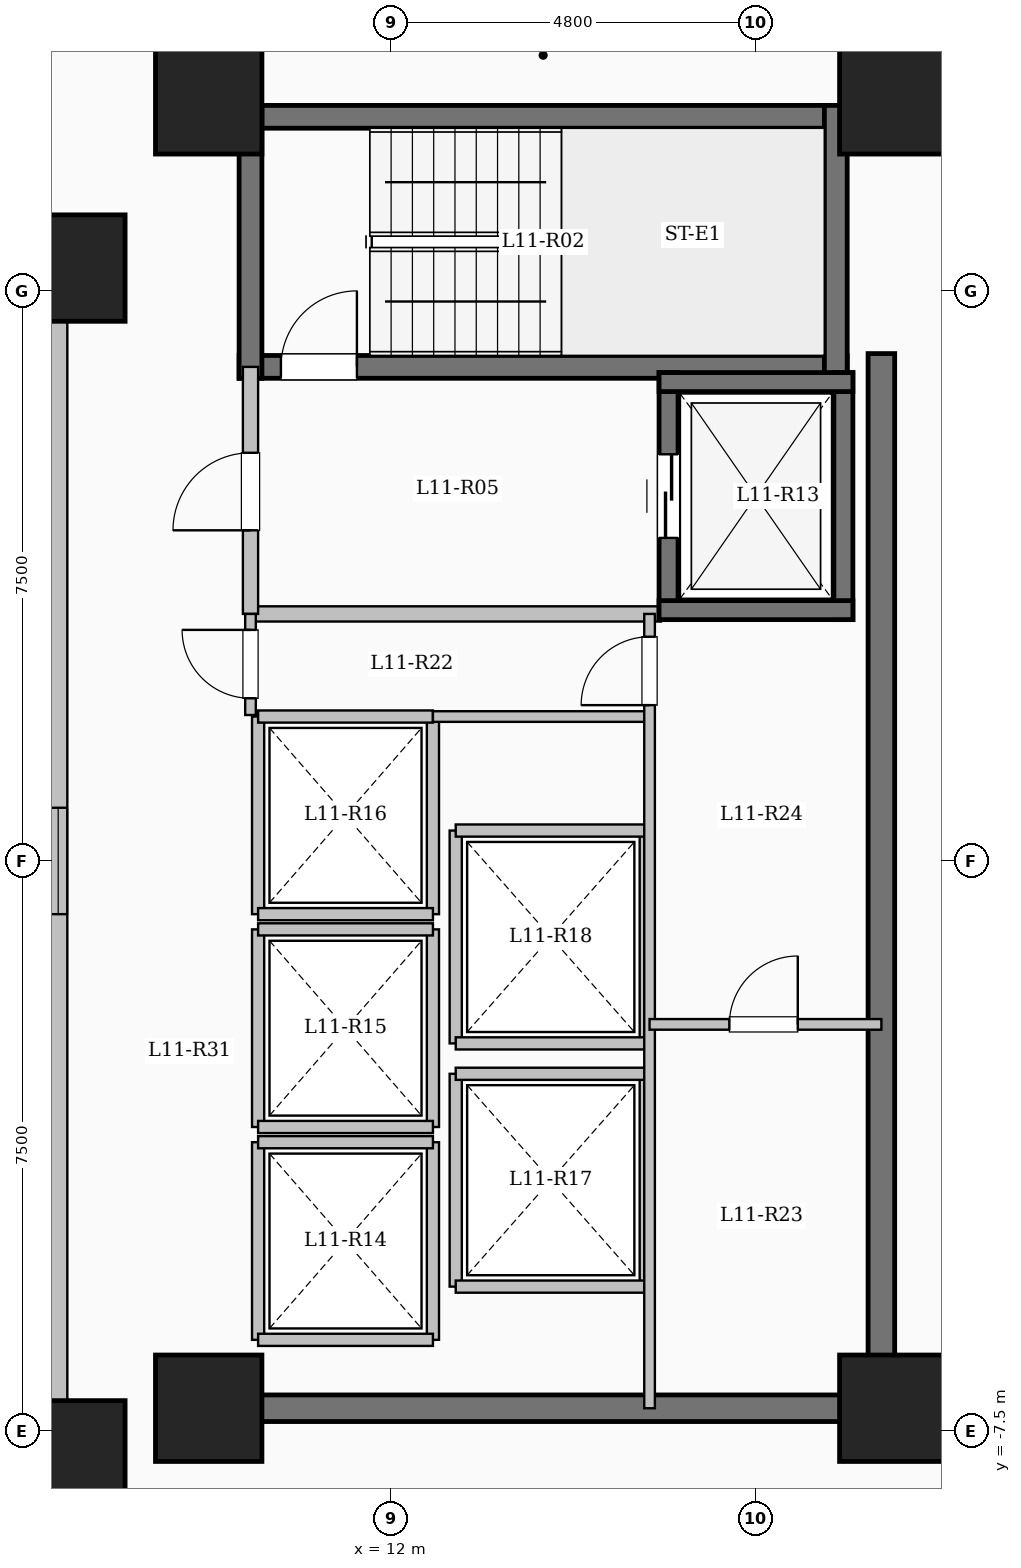
"""IFC4 building model, lengths in metres.
Left out: names, types, materials, properties, quantities, classifications, styles, units other than length and angle.
Written with IfcOpenShell. Run it as: python <this file> out.ifc"""

import sys

from ifc_helpers import new_model, si_unit, direction, frame, frame_2d, origin, origin_2d, place, context, subcontext, project, spatial, rectangle, extrude, element, fill, save


model = new_model("IFC4")
c1 = context("Model", 3, precision=1e-05, world=origin(), true_north=direction((0.0, 1.0)))
c2 = subcontext(c1, "Body", "Model", "MODEL_VIEW")
j1 = project(units=[si_unit("LENGTHUNIT", "METRE"), si_unit("PLANEANGLEUNIT", "RADIAN")], contexts=[c1])
p1 = place(None, origin())
s1 = spatial("IfcSite", under=j1, at=p1, CompositionType="ELEMENT")
p2 = place(p1, origin())
s2 = spatial("IfcBuilding", under=s1, at=p2, CompositionType="ELEMENT")
p3 = place(p2, frame((0.0, 0.0, 44.1)))
s3 = spatial("IfcBuildingStorey", under=s2, at=p3, CompositionType="ELEMENT", Elevation=44.1)
for number, where, z_axis, x_axis in (
    (1, (7.8, -7.8, 0.0), (0.0, 0.0, 1.0), (1.0, 0.0, 0.0)),
    (2, (7.8, 7.8, 0.0), (0.0, 0.0, 1.0), (1.0, 0.0, 0.0)),
    (3, (9.6, -7.2, 0.0), (0.0, 0.0, 1.0), (1.0, 0.0, 0.0)),
    (4, (9.6, 10.0, 0.0), (0.0, 0.0, 1.0), (1.0, 0.0, 0.0)),
    (5, (18.6, -7.2, 0.0), (0.0, 0.0, 1.0), (1.0, 0.0, 0.0)),
    (6, (18.6, 10.0, 0.0), (0.0, 0.0, 1.0), (1.0, 0.0, 0.0)),
):
    element("IfcColumn", number, at=place(p3, frame(where, z_axis=z_axis, x_axis=x_axis)), inside=s3, PredefinedType="COLUMN", context=c2, shape_type="SweptSolid", body=[
        extrude(rectangle(XDim=1.4, YDim=1.4, at=origin_2d()), origin(), (0.0, 0.0, 1.0), 3.35),
    ])
p4 = place(p3, frame((-7.62, -7.62, 0.0), z_axis=(0.0, 0.0, 1.0), x_axis=(1.0, 0.0, 0.0)))
e7 = element("IfcWall", 7, at=p4, inside=s3, PredefinedType="SOLIDWALL", context=c2, shape_type="SweptSolid", body=[
    extrude(rectangle(XDim=15.24, YDim=0.24, at=frame_2d((7.62, 0.0))), origin(), (0.0, 0.0, 1.0), 3.1),
])
p5 = place(p4, frame((6.92, 0.0, 0.95)))
e8 = element("IfcOpeningElement", 8, at=p5, cuts=e7, PredefinedType="OPENING", context=c2, shape_type="SweptSolid", body=[
    extrude(rectangle(XDim=1.4, YDim=1.5, at=frame_2d((0.7, 0.75))), frame((0.0, 0.13, 0.0), z_axis=(0.0, -1.0, 0.0), x_axis=(1.0, 0.0, 0.0)), (0.0, 0.0, 1.0), 0.26),
])
p6 = place(p3, frame((7.62, -7.62, 0.0), z_axis=(0.0, 0.0, 1.0), x_axis=(0.0, 1.0, 0.0)))
e9 = element("IfcWall", 9, at=p6, inside=s3, PredefinedType="SOLIDWALL", context=c2, shape_type="SweptSolid", body=[
    extrude(rectangle(XDim=15.24, YDim=0.24, at=frame_2d((7.62, 0.0))), origin(), (0.0, 0.0, 1.0), 3.1),
])
p7 = place(p6, frame((6.92, 0.0, 0.95)))
e10 = element("IfcOpeningElement", 10, at=p7, cuts=e9, PredefinedType="OPENING", context=c2, shape_type="SweptSolid", body=[
    extrude(rectangle(XDim=1.4, YDim=1.5, at=frame_2d((0.7, 0.75))), frame((0.0, 0.13, 0.0), z_axis=(0.0, -1.0, 0.0), x_axis=(1.0, 0.0, 0.0)), (0.0, 0.0, 1.0), 0.26),
])
p8 = place(p3, frame((7.62, 7.62, 0.0), z_axis=(0.0, 0.0, 1.0), x_axis=(-1.0, 0.0, 0.0)))
e11 = element("IfcWall", 11, at=p8, inside=s3, PredefinedType="SOLIDWALL", context=c2, shape_type="SweptSolid", body=[
    extrude(rectangle(XDim=15.24, YDim=0.24, at=frame_2d((7.62, 0.0))), origin(), (0.0, 0.0, 1.0), 3.1),
])
p9 = place(p8, frame((6.92, 0.0, 0.95)))
e12 = element("IfcOpeningElement", 12, at=p9, cuts=e11, PredefinedType="OPENING", context=c2, shape_type="SweptSolid", body=[
    extrude(rectangle(XDim=1.4, YDim=1.5, at=frame_2d((0.7, 0.75))), frame((0.0, 0.13, 0.0), z_axis=(0.0, -1.0, 0.0), x_axis=(1.0, 0.0, 0.0)), (0.0, 0.0, 1.0), 0.26),
])
p10 = place(p3, frame((10.0, 9.79, 0.0), z_axis=(0.0, 0.0, 1.0), x_axis=(1.0, 0.0, 0.0)))
e13 = element("IfcWall", 13, at=p10, inside=s3, PredefinedType="SHEAR", context=c2, shape_type="SweptSolid", body=[
    extrude(rectangle(XDim=8.0, YDim=0.3, at=frame_2d((4.0, 0.0))), origin(), (0.0, 0.0, 1.0), 3.35),
])
p11 = place(p3, frame((10.0, 6.5, 0.0), z_axis=(0.0, 0.0, 1.0), x_axis=(1.0, 0.0, 0.0)))
e14 = element("IfcWall", 14, at=p11, inside=s3, PredefinedType="SHEAR", context=c2, shape_type="SweptSolid", body=[
    extrude(rectangle(XDim=8.0, YDim=0.3, at=frame_2d((4.0, 0.0))), origin(), (0.0, 0.0, 1.0), 3.35),
])
p12 = place(p11, frame((0.55, 0.0, 0.0)))
e15 = element("IfcOpeningElement", 15, at=p12, cuts=e14, PredefinedType="OPENING", context=c2, shape_type="SweptSolid", body=[
    extrude(rectangle(XDim=1.0, YDim=2.15, at=frame_2d((0.5, 1.075))), frame((0.0, 0.16, 0.0), z_axis=(0.0, -1.0, 0.0), x_axis=(1.0, 0.0, 0.0)), (0.0, 0.0, 1.0), 0.32),
])
for number, where, z_axis, x_axis in (
    (16, (10.15, 6.35, 0.0), (0.0, 0.0, 1.0), (0.0, 1.0, 0.0)),
    (17, (17.85, 6.35, 0.0), (0.0, 0.0, 1.0), (0.0, 1.0, 0.0)),
):
    element("IfcWall", number, at=place(p3, frame(where, z_axis=z_axis, x_axis=x_axis)), inside=s3, PredefinedType="SHEAR", context=c2, shape_type="SweptSolid", body=[
        extrude(rectangle(XDim=3.59, YDim=0.3, at=frame_2d((1.795, 0.0))), origin(), (0.0, 0.0, 1.0), 3.35),
    ])
p13 = place(p3, frame((10.15, 3.25, 0.0), z_axis=(0.0, 0.0, 1.0), x_axis=(1.0, 0.0, 0.0)))
e18 = element("IfcWall", 18, at=p13, inside=s3, PredefinedType="SOLIDWALL", context=c2, shape_type="SweptSolid", body=[
    extrude(rectangle(XDim=5.4, YDim=0.2, at=frame_2d((2.7, 0.0))), origin(), (0.0, 0.0, 1.0), 3.1),
])
p14 = place(p3, frame((10.15, 3.25, 0.0), z_axis=(0.0, 0.0, 1.0), x_axis=(0.0, 1.0, 0.0)))
e19 = element("IfcWall", 19, at=p14, inside=s3, PredefinedType="SOLIDWALL", context=c2, shape_type="SweptSolid", body=[
    extrude(rectangle(XDim=3.25, YDim=0.2, at=frame_2d((1.625, 0.0))), origin(), (0.0, 0.0, 1.0), 3.1),
])
p15 = place(p14, frame((1.1, 0.0, 0.0)))
e20 = element("IfcOpeningElement", 20, at=p15, cuts=e19, PredefinedType="OPENING", context=c2, shape_type="SweptSolid", body=[
    extrude(rectangle(XDim=1.02, YDim=2.15, at=frame_2d((0.51, 1.075))), frame((0.0, 0.11, 0.0), z_axis=(0.0, -1.0, 0.0), x_axis=(1.0, 0.0, 0.0)), (0.0, 0.0, 1.0), 0.22),
])
p16 = place(p3, frame((15.65, 3.175, 0.0), z_axis=(0.0, 0.0, 1.0), x_axis=(0.0, 1.0, 0.0)))
e21 = element("IfcWall", 21, at=p16, inside=s3, PredefinedType="SHEAR", context=c2, shape_type="SweptSolid", body=[
    extrude(rectangle(XDim=3.25, YDim=0.25, at=frame_2d((1.625, 0.0))), origin(), (0.0, 0.0, 1.0), 3.35),
])
p17 = place(p16, frame((1.075, 0.0, 0.0)))
e22 = element("IfcOpeningElement", 22, at=p17, cuts=e21, PredefinedType="OPENING", context=c2, shape_type="SweptSolid", body=[
    extrude(rectangle(XDim=1.1, YDim=2.15, at=frame_2d((0.55, 1.075))), frame((0.0, 0.135, 0.0), z_axis=(0.0, -1.0, 0.0), x_axis=(1.0, 0.0, 0.0)), (0.0, 0.0, 1.0), 0.27),
])
p18 = place(p3, frame((17.95, 3.175, 0.0), z_axis=(0.0, 0.0, 1.0), x_axis=(0.0, 1.0, 0.0)))
e23 = element("IfcWall", 23, at=p18, inside=s3, PredefinedType="SHEAR", context=c2, shape_type="SweptSolid", body=[
    extrude(rectangle(XDim=3.25, YDim=0.25, at=frame_2d((1.625, 0.0))), origin(), (0.0, 0.0, 1.0), 3.35),
])
for number, where, z_axis, x_axis in (
    (24, (15.525, 3.3, 0.0), (0.0, 0.0, 1.0), (1.0, 0.0, 0.0)),
    (25, (15.525, 6.3, 0.0), (0.0, 0.0, 1.0), (1.0, 0.0, 0.0)),
):
    element("IfcWall", number, at=place(p3, frame(where, z_axis=z_axis, x_axis=x_axis)), inside=s3, PredefinedType="SHEAR", context=c2, shape_type="SweptSolid", body=[
        extrude(rectangle(XDim=2.55, YDim=0.25, at=frame_2d((1.275, 0.0))), origin(), (0.0, 0.0, 1.0), 3.35),
    ])
for number, where, z_axis, x_axis in (
    (26, (10.25, -6.3, 0.0), (0.0, 0.0, 1.0), (0.0, 1.0, 0.0)),
    (27, (12.55, -6.3, 0.0), (0.0, 0.0, 1.0), (0.0, 1.0, 0.0)),
):
    element("IfcWall", number, at=place(p3, frame(where, z_axis=z_axis, x_axis=x_axis)), inside=s3, PredefinedType="SOLIDWALL", context=c2, shape_type="SweptSolid", body=[
        extrude(rectangle(XDim=2.6, YDim=0.16, at=frame_2d((1.3, 0.0))), origin(), (0.0, 0.0, 1.0), 3.1),
    ])
for number, where, z_axis, x_axis in (
    (28, (10.25, -6.3, 0.0), (0.0, 0.0, 1.0), (1.0, 0.0, 0.0)),
    (29, (10.25, -3.7, 0.0), (0.0, 0.0, 1.0), (1.0, 0.0, 0.0)),
):
    element("IfcWall", number, at=place(p3, frame(where, z_axis=z_axis, x_axis=x_axis)), inside=s3, PredefinedType="SOLIDWALL", context=c2, shape_type="SweptSolid", body=[
        extrude(rectangle(XDim=2.3, YDim=0.16, at=frame_2d((1.15, 0.0))), origin(), (0.0, 0.0, 1.0), 3.1),
    ])
for number, where, z_axis, x_axis in (
    (30, (10.25, -3.5, 0.0), (0.0, 0.0, 1.0), (0.0, 1.0, 0.0)),
    (31, (12.55, -3.5, 0.0), (0.0, 0.0, 1.0), (0.0, 1.0, 0.0)),
):
    element("IfcWall", number, at=place(p3, frame(where, z_axis=z_axis, x_axis=x_axis)), inside=s3, PredefinedType="SOLIDWALL", context=c2, shape_type="SweptSolid", body=[
        extrude(rectangle(XDim=2.6, YDim=0.16, at=frame_2d((1.3, 0.0))), origin(), (0.0, 0.0, 1.0), 3.1),
    ])
for number, where, z_axis, x_axis in (
    (32, (10.25, -3.5, 0.0), (0.0, 0.0, 1.0), (1.0, 0.0, 0.0)),
    (33, (10.25, -0.9, 0.0), (0.0, 0.0, 1.0), (1.0, 0.0, 0.0)),
):
    element("IfcWall", number, at=place(p3, frame(where, z_axis=z_axis, x_axis=x_axis)), inside=s3, PredefinedType="SOLIDWALL", context=c2, shape_type="SweptSolid", body=[
        extrude(rectangle(XDim=2.3, YDim=0.16, at=frame_2d((1.15, 0.0))), origin(), (0.0, 0.0, 1.0), 3.1),
    ])
for number, where, z_axis, x_axis in (
    (34, (10.25, -0.7, 0.0), (0.0, 0.0, 1.0), (0.0, 1.0, 0.0)),
    (35, (12.55, -0.7, 0.0), (0.0, 0.0, 1.0), (0.0, 1.0, 0.0)),
):
    element("IfcWall", number, at=place(p3, frame(where, z_axis=z_axis, x_axis=x_axis)), inside=s3, PredefinedType="SOLIDWALL", context=c2, shape_type="SweptSolid", body=[
        extrude(rectangle(XDim=2.6, YDim=0.16, at=frame_2d((1.3, 0.0))), origin(), (0.0, 0.0, 1.0), 3.1),
    ])
for number, where, z_axis, x_axis in (
    (36, (10.25, -0.7, 0.0), (0.0, 0.0, 1.0), (1.0, 0.0, 0.0)),
    (37, (10.25, 1.9, 0.0), (0.0, 0.0, 1.0), (1.0, 0.0, 0.0)),
):
    element("IfcWall", number, at=place(p3, frame(where, z_axis=z_axis, x_axis=x_axis)), inside=s3, PredefinedType="SOLIDWALL", context=c2, shape_type="SweptSolid", body=[
        extrude(rectangle(XDim=2.3, YDim=0.16, at=frame_2d((1.15, 0.0))), origin(), (0.0, 0.0, 1.0), 3.1),
    ])
for number, where, z_axis, x_axis in (
    (38, (12.85, -5.6, 0.0), (0.0, 0.0, 1.0), (0.0, 1.0, 0.0)),
    (39, (15.35, -5.6, 0.0), (0.0, 0.0, 1.0), (0.0, 1.0, 0.0)),
):
    element("IfcWall", number, at=place(p3, frame(where, z_axis=z_axis, x_axis=x_axis)), inside=s3, PredefinedType="SOLIDWALL", context=c2, shape_type="SweptSolid", body=[
        extrude(rectangle(XDim=2.8, YDim=0.16, at=frame_2d((1.4, 0.0))), origin(), (0.0, 0.0, 1.0), 3.1),
    ])
for number, where, z_axis, x_axis in (
    (40, (12.85, -5.6, 0.0), (0.0, 0.0, 1.0), (1.0, 0.0, 0.0)),
    (41, (12.85, -2.8, 0.0), (0.0, 0.0, 1.0), (1.0, 0.0, 0.0)),
):
    element("IfcWall", number, at=place(p3, frame(where, z_axis=z_axis, x_axis=x_axis)), inside=s3, PredefinedType="SOLIDWALL", context=c2, shape_type="SweptSolid", body=[
        extrude(rectangle(XDim=2.5, YDim=0.16, at=frame_2d((1.25, 0.0))), origin(), (0.0, 0.0, 1.0), 3.1),
    ])
for number, where, z_axis, x_axis in (
    (42, (12.85, -2.4, 0.0), (0.0, 0.0, 1.0), (0.0, 1.0, 0.0)),
    (43, (15.35, -2.4, 0.0), (0.0, 0.0, 1.0), (0.0, 1.0, 0.0)),
):
    element("IfcWall", number, at=place(p3, frame(where, z_axis=z_axis, x_axis=x_axis)), inside=s3, PredefinedType="SOLIDWALL", context=c2, shape_type="SweptSolid", body=[
        extrude(rectangle(XDim=2.8, YDim=0.16, at=frame_2d((1.4, 0.0))), origin(), (0.0, 0.0, 1.0), 3.1),
    ])
for number, where, z_axis, x_axis in (
    (44, (12.85, -2.4, 0.0), (0.0, 0.0, 1.0), (1.0, 0.0, 0.0)),
    (45, (12.85, 0.4, 0.0), (0.0, 0.0, 1.0), (1.0, 0.0, 0.0)),
):
    element("IfcWall", number, at=place(p3, frame(where, z_axis=z_axis, x_axis=x_axis)), inside=s3, PredefinedType="SOLIDWALL", context=c2, shape_type="SweptSolid", body=[
        extrude(rectangle(XDim=2.5, YDim=0.16, at=frame_2d((1.25, 0.0))), origin(), (0.0, 0.0, 1.0), 3.1),
    ])
p19 = place(p3, frame((18.45, -7.375, 0.0), z_axis=(0.0, 0.0, 1.0), x_axis=(0.0, 1.0, 0.0)))
e46 = element("IfcWall", 46, at=p19, inside=s3, PredefinedType="SHEAR", context=c2, shape_type="SweptSolid", body=[
    extrude(rectangle(XDim=14.05, YDim=0.35, at=frame_2d((7.025, 0.0))), origin(), (0.0, 0.0, 1.0), 3.35),
])
p20 = place(p3, frame((10.075, -7.2, 0.0), z_axis=(0.0, 0.0, 1.0), x_axis=(1.0, 0.0, 0.0)))
e47 = element("IfcWall", 47, at=p20, inside=s3, PredefinedType="SHEAR", context=c2, shape_type="SweptSolid", body=[
    extrude(rectangle(XDim=8.55, YDim=0.35, at=frame_2d((4.275, 0.0))), origin(), (0.0, 0.0, 1.0), 3.35),
])
p21 = place(p3, frame((12.55, 1.9, 0.0), z_axis=(0.0, 0.0, 1.0), x_axis=(1.0, 0.0, 0.0)))
e48 = element("IfcWall", 48, at=p21, inside=s3, PredefinedType="PARTITIONING", context=c2, shape_type="SweptSolid", body=[
    extrude(rectangle(XDim=2.85, YDim=0.14, at=frame_2d((1.425, 0.0))), origin(), (0.0, 0.0, 1.0), 3.1),
])
p22 = place(p3, frame((10.15, 1.92, 0.0), z_axis=(0.0, 0.0, 1.0), x_axis=(0.0, 1.0, 0.0)))
e49 = element("IfcWall", 49, at=p22, inside=s3, PredefinedType="PARTITIONING", context=c2, shape_type="SweptSolid", body=[
    extrude(rectangle(XDim=1.33, YDim=0.14, at=frame_2d((0.665, 0.0))), origin(), (0.0, 0.0, 1.0), 3.1),
])
p23 = place(p22, frame((0.22, 0.0, 0.0)))
e50 = element("IfcOpeningElement", 50, at=p23, cuts=e49, PredefinedType="OPENING", context=c2, shape_type="SweptSolid", body=[
    extrude(rectangle(XDim=0.9, YDim=2.08, at=frame_2d((0.45, 1.04))), frame((0.0, 0.08, 0.0), z_axis=(0.0, -1.0, 0.0), x_axis=(1.0, 0.0, 0.0)), (0.0, 0.0, 1.0), 0.16),
])
p24 = place(p3, frame((15.4, -7.2, 0.0), z_axis=(0.0, 0.0, 1.0), x_axis=(0.0, 1.0, 0.0)))
e51 = element("IfcWall", 51, at=p24, inside=s3, PredefinedType="PARTITIONING", context=c2, shape_type="SweptSolid", body=[
    extrude(rectangle(XDim=10.45, YDim=0.14, at=frame_2d((5.225, 0.0))), origin(), (0.0, 0.0, 1.0), 3.1),
])
p25 = place(p24, frame((9.25, 0.0, 0.0)))
e52 = element("IfcOpeningElement", 52, at=p25, cuts=e51, PredefinedType="OPENING", context=c2, shape_type="SweptSolid", body=[
    extrude(rectangle(XDim=0.9, YDim=2.08, at=frame_2d((0.45, 1.04))), frame((0.0, 0.08, 0.0), z_axis=(0.0, -1.0, 0.0), x_axis=(1.0, 0.0, 0.0)), (0.0, 0.0, 1.0), 0.16),
])
p26 = place(p3, frame((15.4, -2.15, 0.0), z_axis=(0.0, 0.0, 1.0), x_axis=(1.0, 0.0, 0.0)))
e53 = element("IfcWall", 53, at=p26, inside=s3, PredefinedType="PARTITIONING", context=c2, shape_type="SweptSolid", body=[
    extrude(rectangle(XDim=3.05, YDim=0.14, at=frame_2d((1.525, 0.0))), origin(), (0.0, 0.0, 1.0), 3.1),
])
p27 = place(p26, frame((1.05, 0.0, 0.0)))
e54 = element("IfcOpeningElement", 54, at=p27, cuts=e53, PredefinedType="OPENING", context=c2, shape_type="SweptSolid", body=[
    extrude(rectangle(XDim=0.9, YDim=2.08, at=frame_2d((0.45, 1.04))), frame((0.0, 0.08, 0.0), z_axis=(0.0, -1.0, 0.0), x_axis=(1.0, 0.0, 0.0)), (0.0, 0.0, 1.0), 0.16),
])
p28 = place(p7, origin())
e55 = element("IfcWindow", 55, at=p28, inside=s3, PartitioningType="SINGLE_PANEL", PredefinedType="WINDOW", context=c2, shape_type="SweptSolid", body=[
    extrude(rectangle(XDim=1.4, YDim=1.5, at=frame_2d((0.7, 0.75))), frame((0.0, 0.03, 0.0), z_axis=(0.0, -1.0, 0.0), x_axis=(1.0, 0.0, 0.0)), (0.0, 0.0, 1.0), 0.06),
])
fill(e10, e55)
p29 = place(p12, origin())
e56 = element("IfcDoor", 56, at=p29, inside=s3, OperationType="SINGLE_SWING_RIGHT", PredefinedType="DOOR", context=c2, shape_type="SweptSolid", body=[
    extrude(rectangle(XDim=1.0, YDim=2.15, at=frame_2d((0.5, 1.075))), frame((0.0, 0.025, 0.0), z_axis=(0.0, -1.0, 0.0), x_axis=(1.0, 0.0, 0.0)), (0.0, 0.0, 1.0), 0.05),
])
fill(e15, e56)
p30 = place(p15, origin())
e57 = element("IfcDoor", 57, at=p30, inside=s3, OperationType="SINGLE_SWING_LEFT", PredefinedType="DOOR", context=c2, shape_type="SweptSolid", body=[
    extrude(rectangle(XDim=1.02, YDim=2.15, at=frame_2d((0.51, 1.075))), frame((0.0, 0.025, 0.0), z_axis=(0.0, -1.0, 0.0), x_axis=(1.0, 0.0, 0.0)), (0.0, 0.0, 1.0), 0.05),
])
fill(e20, e57)
p31 = place(p17, origin())
e58 = element("IfcDoor", 58, at=p31, inside=s3, OperationType="SLIDING_TO_LEFT", PredefinedType="DOOR", context=c2, shape_type="SweptSolid", body=[
    extrude(rectangle(XDim=1.1, YDim=2.15, at=frame_2d((0.55, 1.075))), frame((0.0, 0.025, 0.0), z_axis=(0.0, -1.0, 0.0), x_axis=(1.0, 0.0, 0.0)), (0.0, 0.0, 1.0), 0.05),
])
fill(e22, e58)
p32 = place(p23, origin())
e59 = element("IfcDoor", 59, at=p32, inside=s3, OperationType="SINGLE_SWING_RIGHT", PredefinedType="DOOR", context=c2, shape_type="SweptSolid", body=[
    extrude(rectangle(XDim=0.9, YDim=2.08, at=frame_2d((0.45, 1.04))), frame((0.0, 0.025, 0.0), z_axis=(0.0, -1.0, 0.0), x_axis=(1.0, 0.0, 0.0)), (0.0, 0.0, 1.0), 0.05),
])
fill(e50, e59)
p33 = place(p25, origin())
e60 = element("IfcDoor", 60, at=p33, inside=s3, OperationType="SINGLE_SWING_LEFT", PredefinedType="DOOR", context=c2, shape_type="SweptSolid", body=[
    extrude(rectangle(XDim=0.9, YDim=2.08, at=frame_2d((0.45, 1.04))), frame((0.0, 0.025, 0.0), z_axis=(0.0, -1.0, 0.0), x_axis=(1.0, 0.0, 0.0)), (0.0, 0.0, 1.0), 0.05),
])
fill(e52, e60)
p34 = place(p27, origin())
e61 = element("IfcDoor", 61, at=p34, inside=s3, OperationType="SINGLE_SWING_RIGHT", PredefinedType="DOOR", context=c2, shape_type="SweptSolid", body=[
    extrude(rectangle(XDim=0.9, YDim=2.08, at=frame_2d((0.45, 1.04))), frame((0.0, 0.025, 0.0), z_axis=(0.0, -1.0, 0.0), x_axis=(1.0, 0.0, 0.0)), (0.0, 0.0, 1.0), 0.05),
])
fill(e54, e61)
save(model, sys.argv[1])
